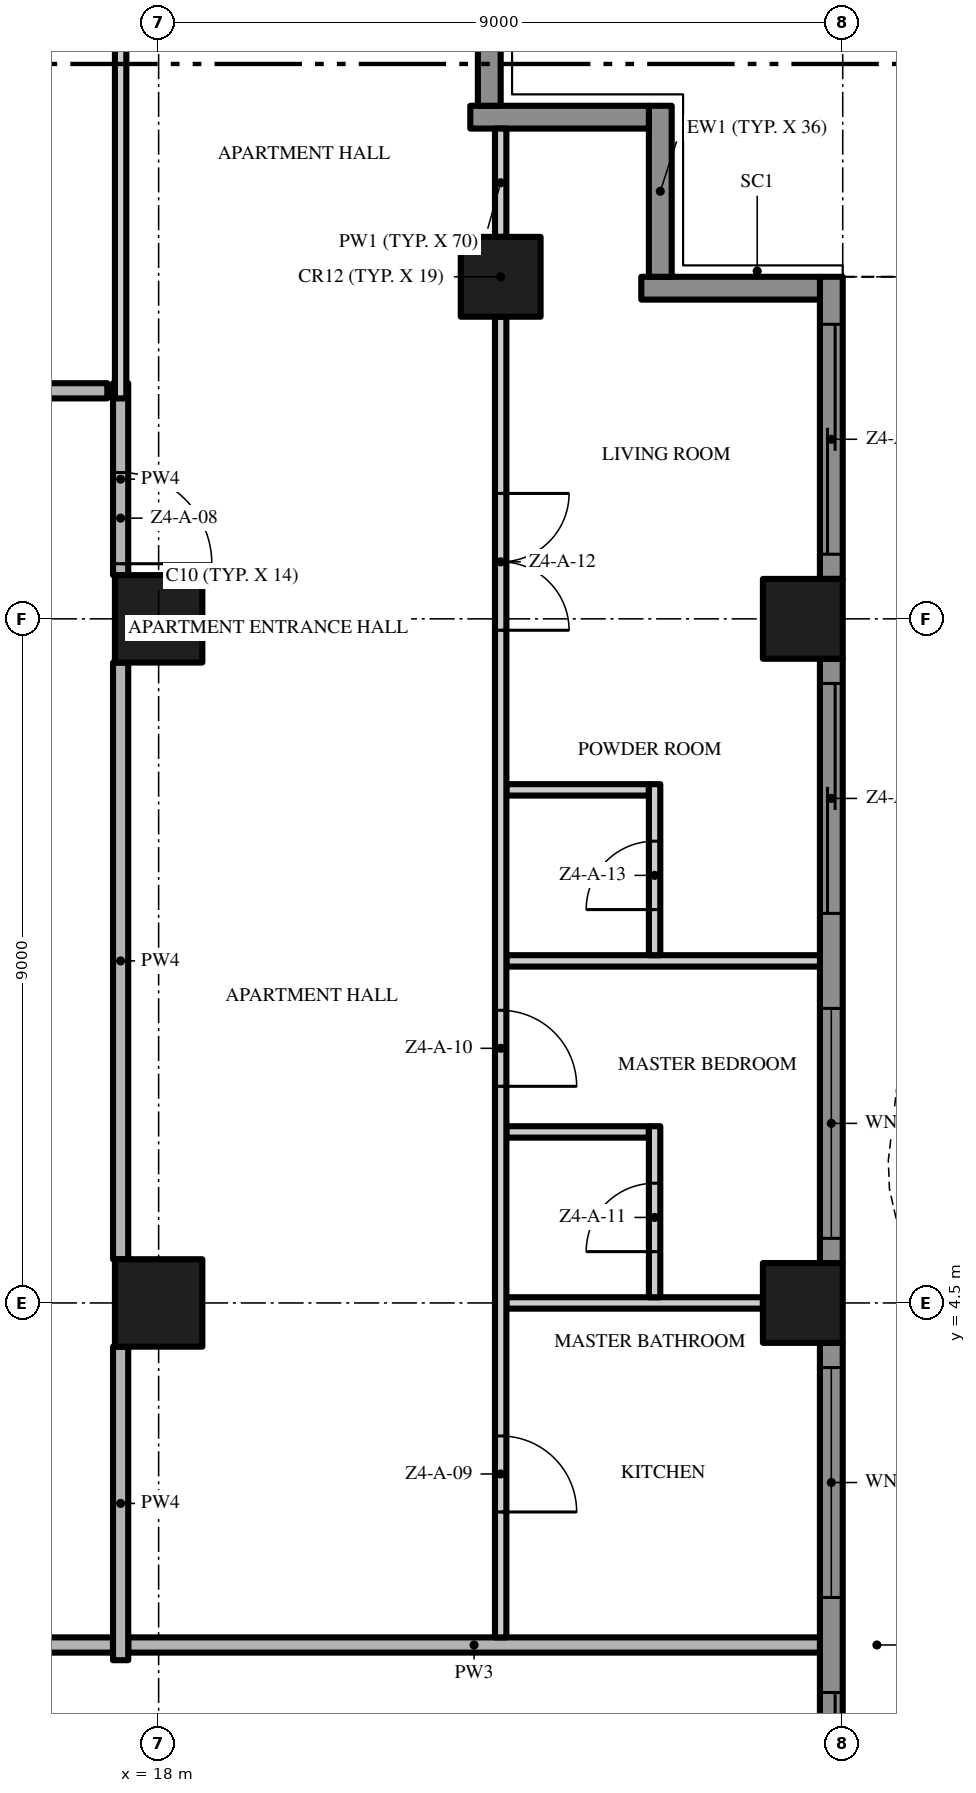
"""IFC4 building model, lengths in metres.
Left out: names, types, materials, properties, quantities, classifications, styles, units other than length and angle.
Written with IfcOpenShell. Run it as: python <this file> out.ifc"""

import sys

from ifc_helpers import new_model, si_unit, direction, frame, frame_2d, origin, origin_2d, place, context, subcontext, project, spatial, polyline, rectangle, outline, extrude, element, fill, save


model = new_model("IFC4")
c1 = context("Model", 3, precision=1e-05, world=origin(), true_north=direction((0.0, 1.0)))
c2 = subcontext(c1, "Body", "Model", "MODEL_VIEW")
j1 = project(units=[si_unit("LENGTHUNIT", "METRE"), si_unit("PLANEANGLEUNIT", "RADIAN")], contexts=[c1])
p1 = place(None, origin())
s1 = spatial("IfcSite", under=j1, at=p1, CompositionType="ELEMENT")
p2 = place(p1, origin())
s2 = spatial("IfcBuilding", under=s1, at=p2, CompositionType="ELEMENT")
p3 = place(p2, frame((0.0, 0.0, 184.4)))
s3 = spatial("IfcBuildingStorey", under=s2, at=p3, CompositionType="ELEMENT", Elevation=184.4)
for number, where, z_axis, x_axis in (
    (1, (18.0, 13.5, 0.0), (0.0, 0.0, 1.0), (1.0, 0.0, 0.0)),
    (2, (18.0, 4.5, 0.0), (0.0, 0.0, 1.0), (1.0, 0.0, 0.0)),
):
    element("IfcColumn", number, at=place(p3, frame(where, z_axis=z_axis, x_axis=x_axis)), inside=s3, PredefinedType="COLUMN", context=c2, shape_type="SweptSolid", body=[
        extrude(rectangle(XDim=1.15, YDim=1.15, at=origin_2d()), origin(), (0.0, 0.0, 1.0), 3.5),
    ])
for number, where, z_axis, x_axis in (
    (3, (26.475, 13.5, 0.0), (0.0, 0.0, 1.0), (1.0, 0.0, 0.0)),
    (4, (22.5, 18.0, 0.0), (0.0, 0.0, 1.0), (1.0, 0.0, 0.0)),
    (5, (26.475, 4.5, 0.0), (0.0, 0.0, 1.0), (1.0, 0.0, 0.0)),
):
    element("IfcColumn", number, at=place(p3, frame(where, z_axis=z_axis, x_axis=x_axis)), inside=s3, PredefinedType="COLUMN", context=c2, shape_type="SweptSolid", body=[
        extrude(rectangle(XDim=1.05, YDim=1.05, at=origin_2d()), origin(), (0.0, 0.0, 1.0), 3.5),
    ])
p4 = place(p3, frame((26.85, 3.975, 0.0), z_axis=(0.0, 0.0, 1.0), x_axis=(0.0, -1.0, 0.0)))
e6 = element("IfcWall", 6, at=p4, inside=s3, PredefinedType="SOLIDWALL", context=c2, shape_type="SweptSolid", body=[
    extrude(rectangle(XDim=7.95, YDim=0.3, at=frame_2d((3.975, 0.0))), origin(), (0.0, 0.0, 1.0), 3.5),
])
p5 = place(p4, frame((4.6, 0.0, 0.0)))
e7 = element("IfcOpeningElement", 7, at=p5, cuts=e6, PredefinedType="OPENING", context=c2, shape_type="SweptSolid", body=[
    extrude(rectangle(XDim=3.025, YDim=2.4, at=frame_2d((1.512, 1.2))), frame((0.0, 0.16, 0.0), z_axis=(0.0, -1.0, 0.0), x_axis=(1.0, 0.0, 0.0)), (0.0, 0.0, 1.0), 0.32),
])
p6 = place(p4, frame((0.325, 0.0, 0.45)))
e8 = element("IfcOpeningElement", 8, at=p6, cuts=e6, PredefinedType="OPENING", context=c2, shape_type="SweptSolid", body=[
    extrude(rectangle(XDim=3.025, YDim=2.65, at=frame_2d((1.512, 1.325))), frame((0.0, 0.16, 0.0), z_axis=(0.0, -1.0, 0.0), x_axis=(1.0, 0.0, 0.0)), (0.0, 0.0, 1.0), 0.32),
])
p7 = place(p3, frame((26.85, 12.975, 0.0), z_axis=(0.0, 0.0, 1.0), x_axis=(0.0, -1.0, 0.0)))
e9 = element("IfcWall", 9, at=p7, inside=s3, PredefinedType="SOLIDWALL", context=c2, shape_type="SweptSolid", body=[
    extrude(rectangle(XDim=7.95, YDim=0.3, at=frame_2d((3.975, 0.0))), origin(), (0.0, 0.0, 1.0), 3.5),
])
p8 = place(p7, frame((4.6, 0.0, 0.45)))
e10 = element("IfcOpeningElement", 10, at=p8, cuts=e9, PredefinedType="OPENING", context=c2, shape_type="SweptSolid", body=[
    extrude(rectangle(XDim=3.025, YDim=2.65, at=frame_2d((1.512, 1.325))), frame((0.0, 0.16, 0.0), z_axis=(0.0, -1.0, 0.0), x_axis=(1.0, 0.0, 0.0)), (0.0, 0.0, 1.0), 0.32),
])
p9 = place(p7, frame((0.325, 0.0, 0.0)))
e11 = element("IfcOpeningElement", 11, at=p9, cuts=e9, PredefinedType="OPENING", context=c2, shape_type="SweptSolid", body=[
    extrude(rectangle(XDim=3.025, YDim=2.4, at=frame_2d((1.512, 1.2))), frame((0.0, 0.16, 0.0), z_axis=(0.0, -1.0, 0.0), x_axis=(1.0, 0.0, 0.0)), (0.0, 0.0, 1.0), 0.32),
])
p10 = place(p3, frame((26.85, 18.0, 0.0), z_axis=(0.0, 0.0, 1.0), x_axis=(0.0, -1.0, 0.0)))
e12 = element("IfcWall", 12, at=p10, inside=s3, PredefinedType="SOLIDWALL", context=c2, shape_type="SweptSolid", body=[
    extrude(rectangle(XDim=3.975, YDim=0.3, at=frame_2d((1.988, 0.0))), origin(), (0.0, 0.0, 1.0), 3.5),
])
p11 = place(p10, frame((0.625, 0.0, 0.0)))
e13 = element("IfcOpeningElement", 13, at=p11, cuts=e12, PredefinedType="OPENING", context=c2, shape_type="SweptSolid", body=[
    extrude(rectangle(XDim=3.025, YDim=2.4, at=frame_2d((1.512, 1.2))), frame((0.0, 0.16, 0.0), z_axis=(0.0, -1.0, 0.0), x_axis=(1.0, 0.0, 0.0)), (0.0, 0.0, 1.0), 0.32),
])
p12 = place(p3, frame((24.35, 17.85, 0.0), z_axis=(0.0, 0.0, 1.0), x_axis=(1.0, 0.0, 0.0)))
e14 = element("IfcWall", 14, at=p12, inside=s3, PredefinedType="SOLIDWALL", context=c2, shape_type="SweptSolid", body=[
    extrude(rectangle(XDim=2.35, YDim=0.3, at=frame_2d((1.175, 0.0))), origin(), (0.0, 0.0, 1.0), 3.5),
])
p13 = place(p3, frame((24.6, 20.25, 0.0), z_axis=(0.0, 0.0, 1.0), x_axis=(0.0, -1.0, 0.0)))
e15 = element("IfcWall", 15, at=p13, inside=s3, PredefinedType="SOLIDWALL", context=c2, shape_type="SweptSolid", body=[
    extrude(rectangle(XDim=2.25, YDim=0.3, at=frame_2d((1.125, 0.0))), origin(), (0.0, 0.0, 1.0), 3.5),
])
p14 = place(p3, frame((22.1, 20.1, 0.0), z_axis=(0.0, 0.0, 1.0), x_axis=(1.0, 0.0, 0.0)))
e16 = element("IfcWall", 16, at=p14, inside=s3, PredefinedType="SOLIDWALL", context=c2, shape_type="SweptSolid", body=[
    extrude(rectangle(XDim=2.35, YDim=0.3, at=frame_2d((1.175, 0.0))), origin(), (0.0, 0.0, 1.0), 3.5),
])
p15 = place(p3, frame((22.35, 22.5, 0.0), z_axis=(0.0, 0.0, 1.0), x_axis=(0.0, -1.0, 0.0)))
e17 = element("IfcWall", 17, at=p15, inside=s3, PredefinedType="SOLIDWALL", context=c2, shape_type="SweptSolid", body=[
    extrude(rectangle(XDim=2.25, YDim=0.3, at=frame_2d((1.125, 0.0))), origin(), (0.0, 0.0, 1.0), 3.5),
])
p16 = place(p3, origin())
e18 = element("IfcWall", 18, at=p16, inside=s3, PredefinedType="USERDEFINED", context=c2, shape_type="SweptSolid", body=[
    extrude(outline(polyline([(29.649, -18.0), (29.985, -16.5), (30.0, -16.125), (29.869, -15.0), (29.345, -13.5), (28.612, -12.0), (27.951, -10.5), (27.615, -9.0), (27.6, -8.625), (27.731, -7.5), (28.255, -6.0), (28.988, -4.5), (29.649, -3.0), (29.985, -1.5), (30.0, -1.125), (29.869, 0.0), (29.345, 1.5), (28.612, 3.0), (27.951, 4.5), (27.615, 6.0), (27.6, 6.375), (27.731, 7.5), (28.255, 9.0), (28.988, 10.5), (29.649, 12.0), (29.985, 13.5), (30.0, 13.875), (29.869, 15.0), (29.345, 16.5), (28.612, 18.0), (28.388, 17.89), (29.114, 16.404), (29.624, 14.944), (29.749, 13.865), (29.736, 13.533), (29.41, 12.079), (28.761, 10.605), (28.024, 9.096), (27.486, 7.556), (27.349, 6.385), (27.366, 5.967), (27.713, 4.421), (28.385, 2.895), (29.114, 1.404), (29.624, -0.056), (29.749, -1.135), (29.736, -1.467), (29.41, -2.921), (28.761, -4.395), (28.024, -5.904), (27.486, -7.444), (27.349, -8.615), (27.366, -9.033), (27.713, -10.579), (28.385, -12.105), (29.114, -13.596), (29.624, -15.056), (29.749, -16.135), (29.736, -16.467), (29.405, -17.945), (29.649, -18.0)])), origin(), (0.0, 0.0, 1.0), 0.9),
])
p17 = place(p3, frame((17.4, 0.0, 0.0), z_axis=(0.0, 0.0, 1.0), x_axis=(-1.0, 0.0, 0.0)))
e19 = element("IfcWall", 19, at=p17, inside=s3, PredefinedType="PARTITIONING", context=c2, shape_type="SweptSolid", body=[
    extrude(rectangle(XDim=17.3, YDim=0.2, at=frame_2d((8.65, 0.0))), origin(), (0.0, 0.0, 1.0), 3.5),
])
p18 = place(p17, frame((7.65, 0.0, 0.0)))
e20 = element("IfcOpeningElement", 20, at=p18, cuts=e19, PredefinedType="OPENING", context=c2, shape_type="SweptSolid", body=[
    extrude(rectangle(XDim=1.5, YDim=2.4, at=frame_2d((0.75, 1.2))), frame((0.0, 0.11, 0.0), z_axis=(0.0, -1.0, 0.0), x_axis=(1.0, 0.0, 0.0)), (0.0, 0.0, 1.0), 0.22),
])
p19 = place(p3, frame((17.6, 0.0, 0.0), z_axis=(0.0, 0.0, 1.0), x_axis=(1.0, 0.0, 0.0)))
e21 = element("IfcWall", 21, at=p19, inside=s3, PredefinedType="PARTITIONING", context=c2, shape_type="SweptSolid", body=[
    extrude(rectangle(XDim=9.1, YDim=0.2, at=frame_2d((4.55, 0.0))), origin(), (0.0, 0.0, 1.0), 3.5),
])
p20 = place(p3, frame((22.575, 4.5, 0.0), z_axis=(0.0, 0.0, 1.0), x_axis=(1.0, 0.0, 0.0)))
e22 = element("IfcWall", 22, at=p20, inside=s3, PredefinedType="PARTITIONING", context=c2, shape_type="SweptSolid", body=[
    extrude(rectangle(XDim=3.375, YDim=0.15, at=frame_2d((1.688, 0.0))), origin(), (0.0, 0.0, 1.0), 3.5),
])
p21 = place(p3, frame((22.575, 6.75, 0.0), z_axis=(0.0, 0.0, 1.0), x_axis=(1.0, 0.0, 0.0)))
e23 = element("IfcWall", 23, at=p21, inside=s3, PredefinedType="PARTITIONING", context=c2, shape_type="SweptSolid", body=[
    extrude(rectangle(XDim=1.875, YDim=0.15, at=frame_2d((0.938, 0.0))), origin(), (0.0, 0.0, 1.0), 3.5),
])
p22 = place(p3, frame((22.575, 9.0, 0.0), z_axis=(0.0, 0.0, 1.0), x_axis=(1.0, 0.0, 0.0)))
e24 = element("IfcWall", 24, at=p22, inside=s3, PredefinedType="PARTITIONING", context=c2, shape_type="SweptSolid", body=[
    extrude(rectangle(XDim=4.125, YDim=0.15, at=frame_2d((2.062, 0.0))), origin(), (0.0, 0.0, 1.0), 3.5),
])
p23 = place(p3, frame((22.575, 11.25, 0.0), z_axis=(0.0, 0.0, 1.0), x_axis=(1.0, 0.0, 0.0)))
e25 = element("IfcWall", 25, at=p23, inside=s3, PredefinedType="PARTITIONING", context=c2, shape_type="SweptSolid", body=[
    extrude(rectangle(XDim=1.875, YDim=0.15, at=frame_2d((0.938, 0.0))), origin(), (0.0, 0.0, 1.0), 3.5),
])
p24 = place(p3, frame((13.5, 16.5, 0.0), z_axis=(0.0, 0.0, 1.0), x_axis=(1.0, 0.0, 0.0)))
e26 = element("IfcWall", 26, at=p24, inside=s3, PredefinedType="PARTITIONING", context=c2, shape_type="SweptSolid", body=[
    extrude(rectangle(XDim=3.825, YDim=0.2, at=frame_2d((1.913, 0.0))), origin(), (0.0, 0.0, 1.0), 3.5),
])
p25 = place(p24, frame((1.55, 0.0, 0.0)))
e27 = element("IfcOpeningElement", 27, at=p25, cuts=e26, PredefinedType="OPENING", context=c2, shape_type="SweptSolid", body=[
    extrude(rectangle(XDim=0.9, YDim=2.1, at=frame_2d((0.45, 1.05))), frame((0.0, 0.11, 0.0), z_axis=(0.0, -1.0, 0.0), x_axis=(1.0, 0.0, 0.0)), (0.0, 0.0, 1.0), 0.22),
])
p26 = place(p3, frame((17.5, -0.2, 0.0), z_axis=(0.0, 0.0, 1.0), x_axis=(0.0, 1.0, 0.0)))
e28 = element("IfcWall", 28, at=p26, inside=s3, PredefinedType="PARTITIONING", context=c2, shape_type="SweptSolid", body=[
    extrude(rectangle(XDim=4.125, YDim=0.2, at=frame_2d((2.062, 0.0))), origin(), (0.0, 0.0, 1.0), 3.5),
])
p27 = place(p3, frame((17.5, 5.075, 0.0), z_axis=(0.0, 0.0, 1.0), x_axis=(0.0, 1.0, 0.0)))
e29 = element("IfcWall", 29, at=p27, inside=s3, PredefinedType="PARTITIONING", context=c2, shape_type="SweptSolid", body=[
    extrude(rectangle(XDim=7.85, YDim=0.2, at=frame_2d((3.925, 0.0))), origin(), (0.0, 0.0, 1.0), 3.5),
])
p28 = place(p3, frame((17.5, 16.6, 0.0), z_axis=(0.0, 0.0, 1.0), x_axis=(0.0, -1.0, 0.0)))
e30 = element("IfcWall", 30, at=p28, inside=s3, PredefinedType="PARTITIONING", context=c2, shape_type="SweptSolid", body=[
    extrude(rectangle(XDim=2.525, YDim=0.2, at=frame_2d((1.262, 0.0))), origin(), (0.0, 0.0, 1.0), 3.5),
])
p29 = place(p28, frame((1.175, 0.0, 0.0)))
e31 = element("IfcOpeningElement", 31, at=p29, cuts=e30, PredefinedType="OPENING", context=c2, shape_type="SweptSolid", body=[
    extrude(rectangle(XDim=1.2, YDim=2.4, at=frame_2d((0.6, 1.2))), frame((0.0, 0.11, 0.0), z_axis=(0.0, -1.0, 0.0), x_axis=(1.0, 0.0, 0.0)), (0.0, 0.0, 1.0), 0.22),
])
p30 = place(p3, frame((17.5, 16.4, 0.0), z_axis=(0.0, 0.0, 1.0), x_axis=(0.0, 1.0, 0.0)))
e32 = element("IfcWall", 32, at=p30, inside=s3, PredefinedType="PARTITIONING", context=c2, shape_type="SweptSolid", body=[
    extrude(rectangle(XDim=5.05, YDim=0.15, at=frame_2d((2.525, 0.0))), origin(), (0.0, 0.0, 1.0), 3.5),
])
p31 = place(p3, frame((22.5, 17.475, 0.0), z_axis=(0.0, 0.0, 1.0), x_axis=(0.0, -1.0, 0.0)))
e33 = element("IfcWall", 33, at=p31, inside=s3, PredefinedType="PARTITIONING", context=c2, shape_type="SweptSolid", body=[
    extrude(rectangle(XDim=17.375, YDim=0.15, at=frame_2d((8.688, 0.0))), origin(), (0.0, 0.0, 1.0), 3.5),
])
p32 = place(p31, frame((14.725, 0.0, 0.0)))
e34 = element("IfcOpeningElement", 34, at=p32, cuts=e33, PredefinedType="OPENING", context=c2, shape_type="SweptSolid", body=[
    extrude(rectangle(XDim=1.0, YDim=2.4, at=frame_2d((0.5, 1.2))), frame((0.0, 0.085, 0.0), z_axis=(0.0, -1.0, 0.0), x_axis=(1.0, 0.0, 0.0)), (0.0, 0.0, 1.0), 0.17),
])
p33 = place(p31, frame((9.125, 0.0, 0.0)))
e35 = element("IfcOpeningElement", 35, at=p33, cuts=e33, PredefinedType="OPENING", context=c2, shape_type="SweptSolid", body=[
    extrude(rectangle(XDim=1.0, YDim=2.4, at=frame_2d((0.5, 1.2))), frame((0.0, 0.085, 0.0), z_axis=(0.0, -1.0, 0.0), x_axis=(1.0, 0.0, 0.0)), (0.0, 0.0, 1.0), 0.17),
])
p34 = place(p31, frame((2.325, 0.0, 0.0)))
e36 = element("IfcOpeningElement", 36, at=p34, cuts=e33, PredefinedType="OPENING", context=c2, shape_type="SweptSolid", body=[
    extrude(rectangle(XDim=1.8, YDim=2.4, at=frame_2d((0.9, 1.2))), frame((0.0, 0.085, 0.0), z_axis=(0.0, -1.0, 0.0), x_axis=(1.0, 0.0, 0.0)), (0.0, 0.0, 1.0), 0.17),
])
p35 = place(p3, frame((22.5, 18.525, 0.0), z_axis=(0.0, 0.0, 1.0), x_axis=(0.0, 1.0, 0.0)))
e37 = element("IfcWall", 37, at=p35, inside=s3, PredefinedType="PARTITIONING", context=c2, shape_type="SweptSolid", body=[
    extrude(rectangle(XDim=1.425, YDim=0.15, at=frame_2d((0.713, 0.0))), origin(), (0.0, 0.0, 1.0), 3.5),
])
p36 = place(p3, frame((24.525, 4.575, 0.0), z_axis=(0.0, 0.0, 1.0), x_axis=(0.0, 1.0, 0.0)))
e38 = element("IfcWall", 38, at=p36, inside=s3, PredefinedType="PARTITIONING", context=c2, shape_type="SweptSolid", body=[
    extrude(rectangle(XDim=2.25, YDim=0.15, at=frame_2d((1.125, 0.0))), origin(), (0.0, 0.0, 1.0), 3.5),
])
p37 = place(p36, frame((0.6, 0.0, 0.0)))
e39 = element("IfcOpeningElement", 39, at=p37, cuts=e38, PredefinedType="OPENING", context=c2, shape_type="SweptSolid", body=[
    extrude(rectangle(XDim=0.9, YDim=2.1, at=frame_2d((0.45, 1.05))), frame((0.0, 0.085, 0.0), z_axis=(0.0, -1.0, 0.0), x_axis=(1.0, 0.0, 0.0)), (0.0, 0.0, 1.0), 0.17),
])
p38 = place(p3, frame((24.525, 9.075, 0.0), z_axis=(0.0, 0.0, 1.0), x_axis=(0.0, 1.0, 0.0)))
e40 = element("IfcWall", 40, at=p38, inside=s3, PredefinedType="PARTITIONING", context=c2, shape_type="SweptSolid", body=[
    extrude(rectangle(XDim=2.25, YDim=0.15, at=frame_2d((1.125, 0.0))), origin(), (0.0, 0.0, 1.0), 3.5),
])
p39 = place(p38, frame((0.6, 0.0, 0.0)))
e41 = element("IfcOpeningElement", 41, at=p39, cuts=e40, PredefinedType="OPENING", context=c2, shape_type="SweptSolid", body=[
    extrude(rectangle(XDim=0.9, YDim=2.1, at=frame_2d((0.45, 1.05))), frame((0.0, 0.085, 0.0), z_axis=(0.0, -1.0, 0.0), x_axis=(1.0, 0.0, 0.0)), (0.0, 0.0, 1.0), 0.17),
])
p40 = place(p5, origin())
e42 = element("IfcDoor", 42, at=p40, inside=s3, OperationType="SINGLE_SWING_LEFT", PredefinedType="DOOR", context=c2, shape_type="SweptSolid", body=[
    extrude(rectangle(XDim=3.025, YDim=2.4, at=frame_2d((1.512, 1.2))), frame((0.0, 0.025, 0.0), z_axis=(0.0, -1.0, 0.0), x_axis=(1.0, 0.0, 0.0)), (0.0, 0.0, 1.0), 0.05),
])
fill(e7, e42)
p41 = place(p6, origin())
e43 = element("IfcWindow", 43, at=p41, inside=s3, PartitioningType="SINGLE_PANEL", PredefinedType="WINDOW", context=c2, shape_type="SweptSolid", body=[
    extrude(rectangle(XDim=3.025, YDim=2.65, at=frame_2d((1.512, 1.325))), frame((0.0, 0.03, 0.0), z_axis=(0.0, -1.0, 0.0), x_axis=(1.0, 0.0, 0.0)), (0.0, 0.0, 1.0), 0.06),
])
fill(e8, e43)
p42 = place(p8, origin())
e44 = element("IfcWindow", 44, at=p42, inside=s3, PartitioningType="SINGLE_PANEL", PredefinedType="WINDOW", context=c2, shape_type="SweptSolid", body=[
    extrude(rectangle(XDim=3.025, YDim=2.65, at=frame_2d((1.512, 1.325))), frame((0.0, 0.03, 0.0), z_axis=(0.0, -1.0, 0.0), x_axis=(1.0, 0.0, 0.0)), (0.0, 0.0, 1.0), 0.06),
])
fill(e10, e44)
p43 = place(p9, origin())
e45 = element("IfcDoor", 45, at=p43, inside=s3, OperationType="SINGLE_SWING_LEFT", PredefinedType="DOOR", context=c2, shape_type="SweptSolid", body=[
    extrude(rectangle(XDim=3.025, YDim=2.4, at=frame_2d((1.512, 1.2))), frame((0.0, 0.025, 0.0), z_axis=(0.0, -1.0, 0.0), x_axis=(1.0, 0.0, 0.0)), (0.0, 0.0, 1.0), 0.05),
])
fill(e11, e45)
p44 = place(p11, origin())
e46 = element("IfcDoor", 46, at=p44, inside=s3, OperationType="SINGLE_SWING_LEFT", PredefinedType="DOOR", context=c2, shape_type="SweptSolid", body=[
    extrude(rectangle(XDim=3.025, YDim=2.4, at=frame_2d((1.512, 1.2))), frame((0.0, 0.025, 0.0), z_axis=(0.0, -1.0, 0.0), x_axis=(1.0, 0.0, 0.0)), (0.0, 0.0, 1.0), 0.05),
])
fill(e13, e46)
p45 = place(p29, origin())
e47 = element("IfcDoor", 47, at=p45, inside=s3, OperationType="SINGLE_SWING_RIGHT", PredefinedType="DOOR", context=c2, shape_type="SweptSolid", body=[
    extrude(rectangle(XDim=1.2, YDim=2.4, at=frame_2d((0.6, 1.2))), frame((0.0, 0.025, 0.0), z_axis=(0.0, -1.0, 0.0), x_axis=(1.0, 0.0, 0.0)), (0.0, 0.0, 1.0), 0.05),
])
fill(e31, e47)
p46 = place(p32, origin())
e48 = element("IfcDoor", 48, at=p46, inside=s3, OperationType="SINGLE_SWING_RIGHT", PredefinedType="DOOR", context=c2, shape_type="SweptSolid", body=[
    extrude(rectangle(XDim=1.0, YDim=2.4, at=frame_2d((0.5, 1.2))), frame((0.0, 0.025, 0.0), z_axis=(0.0, -1.0, 0.0), x_axis=(1.0, 0.0, 0.0)), (0.0, 0.0, 1.0), 0.05),
])
fill(e34, e48)
p47 = place(p33, origin())
e49 = element("IfcDoor", 49, at=p47, inside=s3, OperationType="SINGLE_SWING_RIGHT", PredefinedType="DOOR", context=c2, shape_type="SweptSolid", body=[
    extrude(rectangle(XDim=1.0, YDim=2.4, at=frame_2d((0.5, 1.2))), frame((0.0, 0.025, 0.0), z_axis=(0.0, -1.0, 0.0), x_axis=(1.0, 0.0, 0.0)), (0.0, 0.0, 1.0), 0.05),
])
fill(e35, e49)
p48 = place(p37, origin())
e50 = element("IfcDoor", 50, at=p48, inside=s3, OperationType="SINGLE_SWING_LEFT", PredefinedType="DOOR", context=c2, shape_type="SweptSolid", body=[
    extrude(rectangle(XDim=0.9, YDim=2.1, at=frame_2d((0.45, 1.05))), frame((0.0, 0.025, 0.0), z_axis=(0.0, -1.0, 0.0), x_axis=(1.0, 0.0, 0.0)), (0.0, 0.0, 1.0), 0.05),
])
fill(e39, e50)
p49 = place(p34, origin())
e51 = element("IfcDoor", 51, at=p49, inside=s3, OperationType="DOUBLE_DOOR_SINGLE_SWING", PredefinedType="DOOR", context=c2, shape_type="SweptSolid", body=[
    extrude(rectangle(XDim=1.8, YDim=2.4, at=frame_2d((0.9, 1.2))), frame((0.0, 0.025, 0.0), z_axis=(0.0, -1.0, 0.0), x_axis=(1.0, 0.0, 0.0)), (0.0, 0.0, 1.0), 0.05),
])
fill(e36, e51)
p50 = place(p39, origin())
e52 = element("IfcDoor", 52, at=p50, inside=s3, OperationType="SINGLE_SWING_LEFT", PredefinedType="DOOR", context=c2, shape_type="SweptSolid", body=[
    extrude(rectangle(XDim=0.9, YDim=2.1, at=frame_2d((0.45, 1.05))), frame((0.0, 0.025, 0.0), z_axis=(0.0, -1.0, 0.0), x_axis=(1.0, 0.0, 0.0)), (0.0, 0.0, 1.0), 0.05),
])
fill(e41, e52)
save(model, sys.argv[1])
